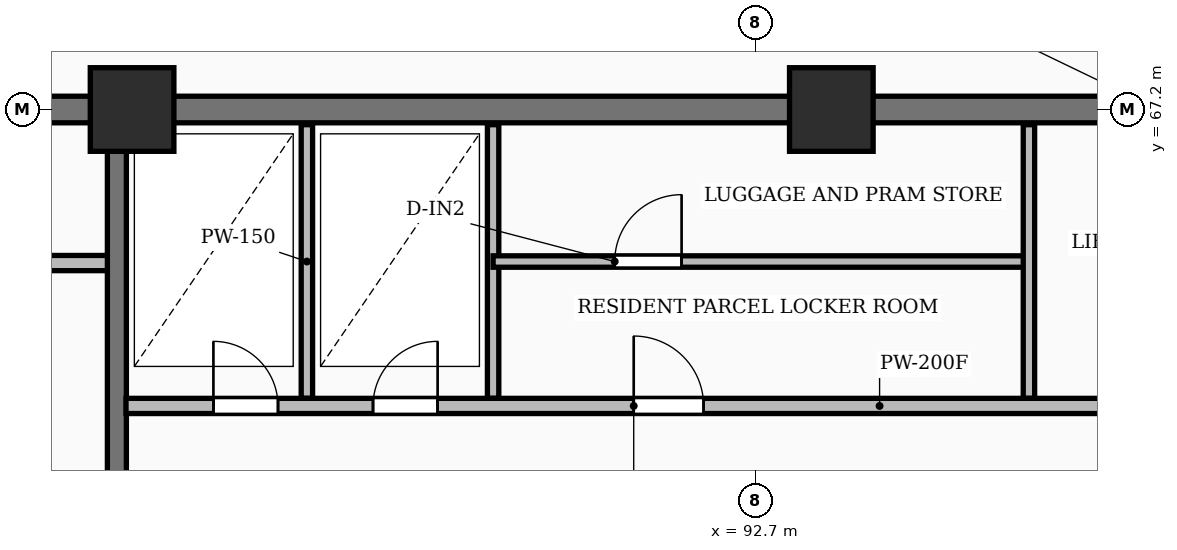
"""IFC4 building model, lengths in metres.
Left out: names, types, materials, properties, quantities, classifications, styles, units other than length and angle.
Written with IfcOpenShell. Run it as: python <this file> out.ifc"""

import sys

from ifc_helpers import new_model, si_unit, direction, frame, frame_2d, origin, origin_2d, place, context, subcontext, project, spatial, rectangle, extrude, element, fill, save


model = new_model("IFC4")
c1 = context("Model", 3, precision=1e-05, world=origin(), true_north=direction((0.0, 1.0)))
c2 = subcontext(c1, "Body", "Model", "MODEL_VIEW")
j1 = project(units=[si_unit("LENGTHUNIT", "METRE"), si_unit("PLANEANGLEUNIT", "RADIAN")], contexts=[c1])
p1 = place(None, origin())
s1 = spatial("IfcSite", under=j1, at=p1, CompositionType="ELEMENT")
p2 = place(p1, origin())
s2 = spatial("IfcBuilding", under=s1, at=p2, CompositionType="ELEMENT")
p3 = place(p2, frame((0.0, 0.0, 10.0)))
s3 = spatial("IfcBuildingStorey", under=s2, at=p3, CompositionType="ELEMENT", Elevation=10.0)
for number, where, z_axis, x_axis in (
    (1, (84.5, 67.2, 0.0), (0.0, 0.0, 1.0), (1.0, 0.0, 0.0)),
    (2, (93.7, 67.2, 0.0), (0.0, 0.0, 1.0), (1.0, 0.0, 0.0)),
):
    element("IfcColumn", number, at=place(p3, frame(where, z_axis=z_axis, x_axis=x_axis)), inside=s3, PredefinedType="COLUMN", context=c2, shape_type="SweptSolid", body=[
        extrude(rectangle(XDim=1.1, YDim=1.1, at=origin_2d()), origin(), (0.0, 0.0, 1.0), 4.5),
    ])
p4 = place(p3, frame((75.95, 67.2, 0.0), z_axis=(0.0, 0.0, 1.0), x_axis=(1.0, 0.0, 0.0)))
e3 = element("IfcWall", 3, at=p4, inside=s3, PredefinedType="SHEAR", context=c2, shape_type="SweptSolid", body=[
    extrude(rectangle(XDim=36.3, YDim=0.35, at=frame_2d((18.15, 0.0))), origin(), (0.0, 0.0, 1.0), 4.5),
])
p5 = place(p4, frame((5.788, 0.0, 0.0)))
e4 = element("IfcOpeningElement", 4, at=p5, cuts=e3, PredefinedType="OPENING", context=c2, shape_type="SweptSolid", body=[
    extrude(rectangle(XDim=1.0, YDim=2.15, at=frame_2d((0.5, 1.075))), frame((0.0, 0.185, 0.0), z_axis=(0.0, -1.0, 0.0), x_axis=(1.0, 0.0, 0.0)), (0.0, 0.0, 1.0), 0.37),
])
p6 = place(p4, frame((22.058, 0.0, 0.0)))
e5 = element("IfcOpeningElement", 5, at=p6, cuts=e3, PredefinedType="OPENING", context=c2, shape_type="SweptSolid", body=[
    extrude(rectangle(XDim=1.5, YDim=2.2, at=frame_2d((0.75, 1.1))), frame((0.0, 0.185, 0.0), z_axis=(0.0, -1.0, 0.0), x_axis=(1.0, 0.0, 0.0)), (0.0, 0.0, 1.0), 0.37),
])
p7 = place(p4, frame((30.45, 0.0, 0.0)))
e6 = element("IfcOpeningElement", 6, at=p7, cuts=e3, PredefinedType="OPENING", context=c2, shape_type="SweptSolid", body=[
    extrude(rectangle(XDim=1.0, YDim=2.15, at=frame_2d((0.5, 1.075))), frame((0.0, 0.185, 0.0), z_axis=(0.0, -1.0, 0.0), x_axis=(1.0, 0.0, 0.0)), (0.0, 0.0, 1.0), 0.37),
])
p8 = place(p3, frame((79.79, 65.18, 0.0), z_axis=(0.0, 0.0, 1.0), x_axis=(1.0, 0.0, 0.0)))
e7 = element("IfcWall", 7, at=p8, inside=s3, PredefinedType="PARTITIONING", context=c2, shape_type="SweptSolid", body=[
    extrude(rectangle(XDim=4.39, YDim=0.2, at=frame_2d((2.195, 0.0))), origin(), (0.0, 0.0, 1.0), 4.2),
])
p9 = place(p8, frame((1.5, 0.0, 0.0)))
e8 = element("IfcOpeningElement", 8, at=p9, cuts=e7, PredefinedType="OPENING", context=c2, shape_type="SweptSolid", body=[
    extrude(rectangle(XDim=1.1, YDim=2.1, at=frame_2d((0.55, 1.05))), frame((0.0, 0.11, 0.0), z_axis=(0.0, -1.0, 0.0), x_axis=(1.0, 0.0, 0.0)), (0.0, 0.0, 1.0), 0.22),
])
p10 = place(p3, frame((84.3, 55.4, 0.0), z_axis=(0.0, 0.0, 1.0), x_axis=(0.0, 1.0, 0.0)))
e9 = element("IfcWall", 9, at=p10, inside=s3, PredefinedType="SHEAR", context=c2, shape_type="SweptSolid", body=[
    extrude(rectangle(XDim=11.6, YDim=0.25, at=frame_2d((5.8, 0.0))), origin(), (0.0, 0.0, 1.0), 4.5),
])
p11 = place(p10, frame((5.2, 0.0, 0.0)))
e10 = element("IfcOpeningElement", 10, at=p11, cuts=e9, PredefinedType="OPENING", context=c2, shape_type="SweptSolid", body=[
    extrude(rectangle(XDim=1.1, YDim=2.1, at=frame_2d((0.55, 1.05))), frame((0.0, 0.135, 0.0), z_axis=(0.0, -1.0, 0.0), x_axis=(1.0, 0.0, 0.0)), (0.0, 0.0, 1.0), 0.27),
])
for number, where, z_axis, x_axis in (
    (11, (86.8, 63.4, 0.0), (0.0, 0.0, 1.0), (0.0, 1.0, 0.0)),
    (12, (89.25, 63.4, 0.0), (0.0, 0.0, 1.0), (0.0, 1.0, 0.0)),
):
    element("IfcWall", number, at=place(p3, frame(where, z_axis=z_axis, x_axis=x_axis)), inside=s3, PredefinedType="PARTITIONING", context=c2, shape_type="SweptSolid", body=[
        extrude(rectangle(XDim=3.6, YDim=0.15, at=frame_2d((1.8, 0.0))), origin(), (0.0, 0.0, 1.0), 4.2),
    ])
p12 = place(p3, frame((89.25, 65.2, 0.0), z_axis=(0.0, 0.0, 1.0), x_axis=(1.0, 0.0, 0.0)))
e13 = element("IfcWall", 13, at=p12, inside=s3, PredefinedType="PARTITIONING", context=c2, shape_type="SweptSolid", body=[
    extrude(rectangle(XDim=7.05, YDim=0.15, at=frame_2d((3.525, 0.0))), origin(), (0.0, 0.0, 1.0), 4.2),
])
p13 = place(p12, frame((1.6, 0.0, 0.0)))
e14 = element("IfcOpeningElement", 14, at=p13, cuts=e13, PredefinedType="OPENING", context=c2, shape_type="SweptSolid", body=[
    extrude(rectangle(XDim=0.88, YDim=2.06, at=frame_2d((0.44, 1.03))), frame((0.0, 0.085, 0.0), z_axis=(0.0, -1.0, 0.0), x_axis=(1.0, 0.0, 0.0)), (0.0, 0.0, 1.0), 0.17),
])
p14 = place(p3, frame((96.3, 63.4, 0.0), z_axis=(0.0, 0.0, 1.0), x_axis=(0.0, 1.0, 0.0)))
e15 = element("IfcWall", 15, at=p14, inside=s3, PredefinedType="PARTITIONING", context=c2, shape_type="SweptSolid", body=[
    extrude(rectangle(XDim=3.6, YDim=0.15, at=frame_2d((1.8, 0.0))), origin(), (0.0, 0.0, 1.0), 4.2),
])
p15 = place(p3, frame((84.42, 63.3, 0.0), z_axis=(0.0, 0.0, 1.0), x_axis=(1.0, 0.0, 0.0)))
e16 = element("IfcWall", 16, at=p15, inside=s3, PredefinedType="PARTITIONING", context=c2, shape_type="SweptSolid", body=[
    extrude(rectangle(XDim=19.83, YDim=0.2, at=frame_2d((9.915, 0.0))), origin(), (0.0, 0.0, 1.0), 4.2),
])
p16 = place(p15, frame((1.15, 0.0, 0.0)))
e17 = element("IfcOpeningElement", 17, at=p16, cuts=e16, PredefinedType="OPENING", context=c2, shape_type="SweptSolid", body=[
    extrude(rectangle(XDim=0.85, YDim=2.05, at=frame_2d((0.425, 1.025))), frame((0.0, 0.11, 0.0), z_axis=(0.0, -1.0, 0.0), x_axis=(1.0, 0.0, 0.0)), (0.0, 0.0, 1.0), 0.22),
])
p17 = place(p15, frame((3.25, 0.0, 0.0)))
e18 = element("IfcOpeningElement", 18, at=p17, cuts=e16, PredefinedType="OPENING", context=c2, shape_type="SweptSolid", body=[
    extrude(rectangle(XDim=0.85, YDim=2.05, at=frame_2d((0.425, 1.025))), frame((0.0, 0.11, 0.0), z_axis=(0.0, -1.0, 0.0), x_axis=(1.0, 0.0, 0.0)), (0.0, 0.0, 1.0), 0.22),
])
p18 = place(p15, frame((13.08, 0.0, 0.0)))
e19 = element("IfcOpeningElement", 19, at=p18, cuts=e16, PredefinedType="OPENING", context=c2, shape_type="SweptSolid", body=[
    extrude(rectangle(XDim=1.5, YDim=2.2, at=frame_2d((0.75, 1.1))), frame((0.0, 0.11, 0.0), z_axis=(0.0, -1.0, 0.0), x_axis=(1.0, 0.0, 0.0)), (0.0, 0.0, 1.0), 0.22),
])
p19 = place(p15, frame((6.68, 0.0, 0.0)))
e20 = element("IfcOpeningElement", 20, at=p19, cuts=e16, PredefinedType="OPENING", context=c2, shape_type="SweptSolid", body=[
    extrude(rectangle(XDim=0.92, YDim=2.08, at=frame_2d((0.46, 1.04))), frame((0.0, 0.11, 0.0), z_axis=(0.0, -1.0, 0.0), x_axis=(1.0, 0.0, 0.0)), (0.0, 0.0, 1.0), 0.22),
])
p20 = place(p15, frame((16.33, 0.0, 0.0)))
e21 = element("IfcOpeningElement", 21, at=p20, cuts=e16, PredefinedType="OPENING", context=c2, shape_type="SweptSolid", body=[
    extrude(rectangle(XDim=0.88, YDim=2.06, at=frame_2d((0.44, 1.03))), frame((0.0, 0.11, 0.0), z_axis=(0.0, -1.0, 0.0), x_axis=(1.0, 0.0, 0.0)), (0.0, 0.0, 1.0), 0.22),
])
p21 = place(p13, origin())
e22 = element("IfcDoor", 22, at=p21, inside=s3, OperationType="SINGLE_SWING_RIGHT", PredefinedType="DOOR", context=c2, shape_type="SweptSolid", body=[
    extrude(rectangle(XDim=0.88, YDim=2.06, at=frame_2d((0.44, 1.03))), frame((0.0, 0.025, 0.0), z_axis=(0.0, -1.0, 0.0), x_axis=(1.0, 0.0, 0.0)), (0.0, 0.0, 1.0), 0.05),
])
fill(e14, e22)
p22 = place(p16, origin())
e23 = element("IfcDoor", 23, at=p22, inside=s3, OperationType="SINGLE_SWING_LEFT", PredefinedType="DOOR", context=c2, shape_type="SweptSolid", body=[
    extrude(rectangle(XDim=0.85, YDim=2.05, at=frame_2d((0.425, 1.025))), frame((0.0, 0.025, 0.0), z_axis=(0.0, -1.0, 0.0), x_axis=(1.0, 0.0, 0.0)), (0.0, 0.0, 1.0), 0.05),
])
fill(e17, e23)
p23 = place(p17, origin())
e24 = element("IfcDoor", 24, at=p23, inside=s3, OperationType="SINGLE_SWING_RIGHT", PredefinedType="DOOR", context=c2, shape_type="SweptSolid", body=[
    extrude(rectangle(XDim=0.85, YDim=2.05, at=frame_2d((0.425, 1.025))), frame((0.0, 0.025, 0.0), z_axis=(0.0, -1.0, 0.0), x_axis=(1.0, 0.0, 0.0)), (0.0, 0.0, 1.0), 0.05),
])
fill(e18, e24)
p24 = place(p19, origin())
e25 = element("IfcDoor", 25, at=p24, inside=s3, OperationType="SINGLE_SWING_LEFT", PredefinedType="DOOR", context=c2, shape_type="SweptSolid", body=[
    extrude(rectangle(XDim=0.92, YDim=2.08, at=frame_2d((0.46, 1.04))), frame((0.0, 0.025, 0.0), z_axis=(0.0, -1.0, 0.0), x_axis=(1.0, 0.0, 0.0)), (0.0, 0.0, 1.0), 0.05),
])
fill(e20, e25)
save(model, sys.argv[1])
